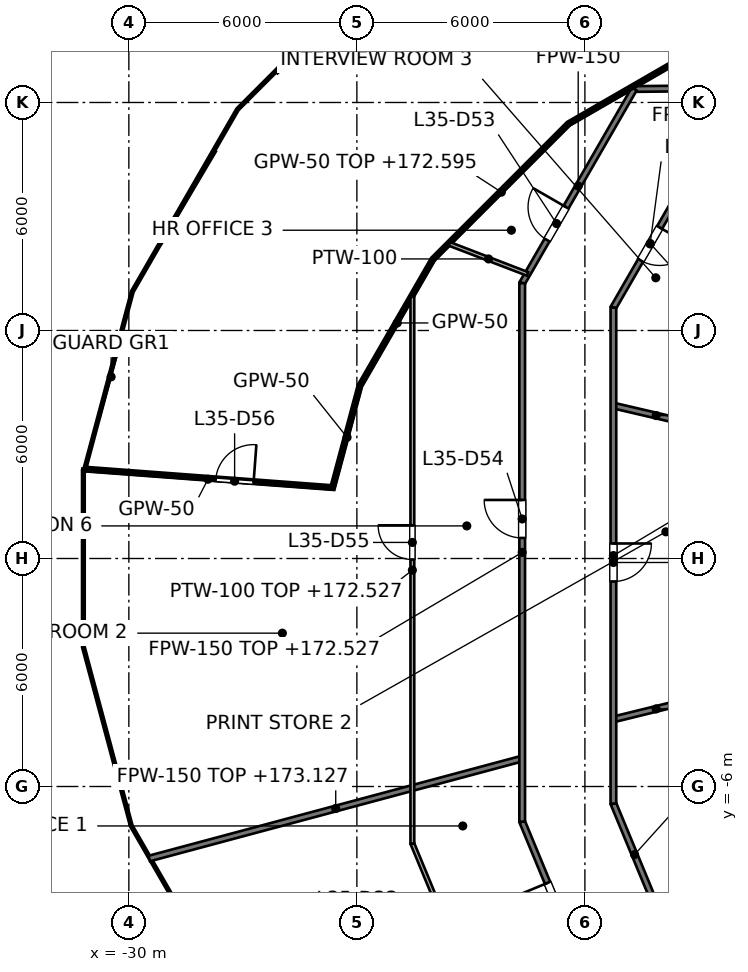
"""IFC4 building model, lengths in metres.
Left out: names, types, materials, properties, quantities, classifications, styles, units other than length and angle.
Written with IfcOpenShell. Run it as: python <this file> out.ifc"""

import sys

from ifc_helpers import new_model, si_unit, direction, frame, frame_2d, origin, place, context, subcontext, project, spatial, rectangle, extrude, element, fill, save


model = new_model("IFC4")
c1 = context("Model", 3, precision=1e-05, world=origin(), true_north=direction((0.0, 1.0)))
c2 = subcontext(c1, "Body", "Model", "MODEL_VIEW")
j1 = project(units=[si_unit("LENGTHUNIT", "METRE"), si_unit("PLANEANGLEUNIT", "RADIAN")], contexts=[c1])
p1 = place(None, origin())
s1 = spatial("IfcSite", under=j1, at=p1, CompositionType="ELEMENT")
p2 = place(p1, origin())
s2 = spatial("IfcBuilding", under=s1, at=p2, CompositionType="ELEMENT")
p3 = place(p2, frame((0.0, 0.0, 169.6)))
s3 = spatial("IfcBuildingStorey", under=s2, at=p3, CompositionType="ELEMENT", Elevation=169.6)
p4 = place(p3, frame((-19.65, -6.925, 0.0), z_axis=(0.0, 0.0, 1.0), x_axis=(0.38279467838, -0.923833445056, 0.0)))
e1 = element("IfcWall", 1, at=p4, inside=s3, PredefinedType="PARTITIONING", context=c2, shape_type="SweptSolid", body=[
    extrude(rectangle(XDim=4.382, YDim=0.15, at=frame_2d((2.191, 0.0))), origin(), (0.0, 0.0, 1.0), 2.995),
])
p5 = place(p4, frame((1.744, 0.0, 0.0)))
e2 = element("IfcOpeningElement", 2, at=p5, cuts=e1, PredefinedType="OPENING", context=c2, shape_type="SweptSolid", body=[
    extrude(rectangle(XDim=1.0, YDim=2.1, at=frame_2d((0.5, 1.05))), frame((0.0, 0.075, 0.0), z_axis=(0.0, -1.0, 0.0), x_axis=(1.0, 0.0, 0.0)), (0.0, 0.0, 1.0), 0.15),
])
p6 = place(p3, frame((-17.25, -6.448, 0.0), z_axis=(0.0, 0.0, 1.0), x_axis=(0.382791482122, -0.923834769434, 0.0)))
e3 = element("IfcWall", 3, at=p6, inside=s3, PredefinedType="PARTITIONING", context=c2, shape_type="SweptSolid", body=[
    extrude(rectangle(XDim=2.91, YDim=0.15, at=frame_2d((1.455, 0.0))), origin(), (0.0, 0.0, 1.0), 2.995),
])
p7 = place(p3, frame((-17.25, 4.024, 0.0), z_axis=(0.0, 0.0, 1.0), x_axis=(0.973873936825, -0.227089311007, 0.0)))
e4 = element("IfcWall", 4, at=p7, inside=s3, PredefinedType="PARTITIONING", context=c2, shape_type="SweptSolid", body=[
    extrude(rectangle(XDim=2.31, YDim=0.15, at=frame_2d((1.155, 0.0))), origin(), (0.0, 0.0, 1.0), 2.927),
])
p8 = place(p3, frame((-16.7, 12.355, 0.0), z_axis=(0.0, 0.0, 1.0), x_axis=(0.999951312483, 0.009867758809, 0.0)))
e5 = element("IfcWall", 5, at=p8, inside=s3, PredefinedType="PARTITIONING", context=c2, shape_type="SweptSolid", body=[
    extrude(rectangle(XDim=30.927, YDim=0.15, at=frame_2d((15.463, 0.0))), origin(), (0.0, 0.0, 1.0), 2.927),
])
p9 = place(p8, frame((27.896, 0.0, 0.0)))
e6 = element("IfcOpeningElement", 6, at=p9, cuts=e5, PredefinedType="OPENING", context=c2, shape_type="SweptSolid", body=[
    extrude(rectangle(XDim=1.0, YDim=2.1, at=frame_2d((0.5, 1.05))), frame((0.0, 0.075, 0.0), z_axis=(0.0, -1.0, 0.0), x_axis=(1.0, 0.0, 0.0)), (0.0, 0.0, 1.0), 0.15),
])
p10 = place(p8, frame((20.733, 0.0, 0.0)))
e7 = element("IfcOpeningElement", 7, at=p10, cuts=e5, PredefinedType="OPENING", context=c2, shape_type="SweptSolid", body=[
    extrude(rectangle(XDim=1.0, YDim=2.1, at=frame_2d((0.5, 1.05))), frame((0.0, 0.075, 0.0), z_axis=(0.0, -1.0, 0.0), x_axis=(1.0, 0.0, 0.0)), (0.0, 0.0, 1.0), 0.15),
])
p11 = place(p8, frame((15.014, 0.0, 0.0)))
e8 = element("IfcOpeningElement", 8, at=p11, cuts=e5, PredefinedType="OPENING", context=c2, shape_type="SweptSolid", body=[
    extrude(rectangle(XDim=1.0, YDim=2.1, at=frame_2d((0.5, 1.05))), frame((0.0, 0.075, 0.0), z_axis=(0.0, -1.0, 0.0), x_axis=(1.0, 0.0, 0.0)), (0.0, 0.0, 1.0), 0.15),
])
p12 = place(p8, frame((8.025, 0.0, 0.0)))
e9 = element("IfcOpeningElement", 9, at=p12, cuts=e5, PredefinedType="OPENING", context=c2, shape_type="SweptSolid", body=[
    extrude(rectangle(XDim=1.0, YDim=2.1, at=frame_2d((0.5, 1.05))), frame((0.0, 0.075, 0.0), z_axis=(0.0, -1.0, 0.0), x_axis=(1.0, 0.0, 0.0)), (0.0, 0.0, 1.0), 0.15),
])
p13 = place(p3, frame((-17.25, -4.234, 0.0), z_axis=(0.0, 0.0, 1.0), x_axis=(0.971126143966, 0.238566578769, 0.0)))
e10 = element("IfcWall", 10, at=p13, inside=s3, PredefinedType="PARTITIONING", context=c2, shape_type="SweptSolid", body=[
    extrude(rectangle(XDim=2.317, YDim=0.15, at=frame_2d((1.158, 0.0))), origin(), (0.0, 0.0, 1.0), 2.927),
])
p14 = place(p3, frame((-29.463, -7.895, 0.0), z_axis=(0.0, 0.0, 1.0), x_axis=(0.965899878732, 0.258915863296, 0.0)))
e11 = element("IfcWall", 11, at=p14, inside=s3, PredefinedType="PARTITIONING", context=c2, shape_type="SweptSolid", body=[
    extrude(rectangle(XDim=10.159, YDim=0.15, at=frame_2d((5.08, 0.0))), origin(), (0.0, 0.0, 1.0), 3.527),
])
p15 = place(p3, frame((-17.25, 6.603, 0.0), z_axis=(0.0, 0.0, 1.0), x_axis=(0.499659014053, 0.866222182627, 0.0)))
e12 = element("IfcWall", 12, at=p15, inside=s3, PredefinedType="PARTITIONING", context=c2, shape_type="SweptSolid", body=[
    extrude(rectangle(XDim=3.887, YDim=0.15, at=frame_2d((1.943, 0.0))), origin(), (0.0, 0.0, 1.0), 2.995),
])
p16 = place(p15, frame((1.434, 0.0, 0.0)))
e13 = element("IfcOpeningElement", 13, at=p16, cuts=e12, PredefinedType="OPENING", context=c2, shape_type="SweptSolid", body=[
    extrude(rectangle(XDim=1.0, YDim=2.1, at=frame_2d((0.5, 1.05))), frame((0.0, 0.075, 0.0), z_axis=(0.0, -1.0, 0.0), x_axis=(1.0, 0.0, 0.0)), (0.0, 0.0, 1.0), 0.15),
])
p17 = place(p3, frame((-19.65, 7.246, 0.0), z_axis=(0.0, 0.0, 1.0), x_axis=(0.499673489744, 0.866213832519, 0.0)))
e14 = element("IfcWall", 14, at=p17, inside=s3, PredefinedType="PARTITIONING", context=c2, shape_type="SweptSolid", body=[
    extrude(rectangle(XDim=5.899, YDim=0.15, at=frame_2d((2.95, 0.0))), origin(), (0.0, 0.0, 1.0), 2.995),
])
p18 = place(p17, frame((1.31, 0.0, 0.0)))
e15 = element("IfcOpeningElement", 15, at=p18, cuts=e14, PredefinedType="OPENING", context=c2, shape_type="SweptSolid", body=[
    extrude(rectangle(XDim=1.0, YDim=2.1, at=frame_2d((0.5, 1.05))), frame((0.0, 0.075, 0.0), z_axis=(0.0, -1.0, 0.0), x_axis=(1.0, 0.0, 0.0)), (0.0, 0.0, 1.0), 0.15),
])
p19 = place(p3, frame((-17.25, -6.448, 0.0), z_axis=(0.0, 0.0, 1.0), x_axis=(0.0, 1.0, 0.0)))
e16 = element("IfcWall", 16, at=p19, inside=s3, PredefinedType="PARTITIONING", context=c2, shape_type="SweptSolid", body=[
    extrude(rectangle(XDim=13.051, YDim=0.15, at=frame_2d((6.525, 0.0))), origin(), (0.0, 0.0, 1.0), 2.927),
])
p20 = place(p19, frame((5.843, 0.0, 0.0)))
e17 = element("IfcOpeningElement", 17, at=p20, cuts=e16, PredefinedType="OPENING", context=c2, shape_type="SweptSolid", body=[
    extrude(rectangle(XDim=1.0, YDim=2.1, at=frame_2d((0.5, 1.05))), frame((0.0, 0.075, 0.0), z_axis=(0.0, -1.0, 0.0), x_axis=(1.0, 0.0, 0.0)), (0.0, 0.0, 1.0), 0.15),
])
p21 = place(p3, frame((-19.65, -6.925, 0.0), z_axis=(0.0, 0.0, 1.0), x_axis=(0.0, 1.0, 0.0)))
e18 = element("IfcWall", 18, at=p21, inside=s3, PredefinedType="PARTITIONING", context=c2, shape_type="SweptSolid", body=[
    extrude(rectangle(XDim=14.171, YDim=0.15, at=frame_2d((7.085, 0.0))), origin(), (0.0, 0.0, 1.0), 2.927),
])
p22 = place(p21, frame((7.466, 0.0, 0.0)))
e19 = element("IfcOpeningElement", 19, at=p22, cuts=e18, PredefinedType="OPENING", context=c2, shape_type="SweptSolid", body=[
    extrude(rectangle(XDim=1.0, YDim=2.1, at=frame_2d((0.5, 1.05))), frame((0.0, 0.075, 0.0), z_axis=(0.0, -1.0, 0.0), x_axis=(1.0, 0.0, 0.0)), (0.0, 0.0, 1.0), 0.15),
])
p23 = place(p3, frame((-31.216, 2.332, 0.0), z_axis=(0.0, 0.0, 1.0), x_axis=(0.997231283114, -0.074362409721, 0.0)))
e20 = element("IfcWall", 20, at=p23, inside=s3, PredefinedType="PARTITIONING", context=c2, shape_type="SweptSolid", body=[
    extrude(rectangle(XDim=6.615, YDim=0.05, at=frame_2d((3.308, 0.0))), origin(), (0.0, 0.0, 1.0), 2.927),
])
p24 = place(p23, frame((3.51, 0.0, 0.0)))
e21 = element("IfcOpeningElement", 21, at=p24, cuts=e20, PredefinedType="OPENING", context=c2, shape_type="SweptSolid", body=[
    extrude(rectangle(XDim=1.0, YDim=2.1, at=frame_2d((0.5, 1.05))), frame((0.0, 0.025, 0.0), z_axis=(0.0, -1.0, 0.0), x_axis=(1.0, 0.0, 0.0)), (0.0, 0.0, 1.0), 0.05),
])
p25 = place(p3, frame((-18.419, 11.419, 0.0), z_axis=(0.0, 0.0, 1.0), x_axis=(0.866045865693, 0.499964557259, 0.0)))
e22 = element("IfcWall", 22, at=p25, inside=s3, PredefinedType="PARTITIONING", context=c2, shape_type="SweptSolid", body=[
    extrude(rectangle(XDim=6.692, YDim=0.05, at=frame_2d((3.346, 0.0))), origin(), (0.0, 0.0, 1.0), 2.995),
])
p26 = place(p3, frame((-21.977, 7.861, 0.0), z_axis=(0.0, 0.0, 1.0), x_axis=(0.70713104079, 0.707082520751, 0.0)))
e23 = element("IfcWall", 23, at=p26, inside=s3, PredefinedType="PARTITIONING", context=c2, shape_type="SweptSolid", body=[
    extrude(rectangle(XDim=5.032, YDim=0.05, at=frame_2d((2.516, 0.0))), origin(), (0.0, 0.0, 1.0), 2.995),
])
p27 = place(p3, frame((-23.897, 4.536, 0.0), z_axis=(0.0, 0.0, 1.0), x_axis=(0.500023335103, 0.866011930837, 0.0)))
e24 = element("IfcWall", 24, at=p27, inside=s3, PredefinedType="PARTITIONING", context=c2, shape_type="SweptSolid", body=[
    extrude(rectangle(XDim=3.84, YDim=0.05, at=frame_2d((1.92, 0.0))), origin(), (0.0, 0.0, 1.0), 2.927),
])
p28 = place(p3, frame((-24.619, 1.84, 0.0), z_axis=(0.0, 0.0, 1.0), x_axis=(0.258680696783, 0.965962885991, 0.0)))
e25 = element("IfcWall", 25, at=p28, inside=s3, PredefinedType="PARTITIONING", context=c2, shape_type="SweptSolid", body=[
    extrude(rectangle(XDim=2.791, YDim=0.05, at=frame_2d((1.396, 0.0))), origin(), (0.0, 0.0, 1.0), 2.927),
])
p29 = place(p3, frame((-22.54, -7.5, 0.0), z_axis=(0.0, 0.0, 1.0), x_axis=(0.382704529509, -0.923870793506, 0.0)))
e26 = element("IfcWall", 26, at=p29, inside=s3, PredefinedType="PARTITIONING", context=c2, shape_type="SweptSolid", body=[
    extrude(rectangle(XDim=6.154, YDim=0.1, at=frame_2d((3.077, 0.0))), origin(), (0.0, 0.0, 1.0), 2.995),
])
p30 = place(p3, frame((-21.561, 8.277, 0.0), z_axis=(0.0, 0.0, 1.0), x_axis=(0.933462969835, -0.358673784862, 0.0)))
e27 = element("IfcWall", 27, at=p30, inside=s3, PredefinedType="PARTITIONING", context=c2, shape_type="SweptSolid", body=[
    extrude(rectangle(XDim=2.197, YDim=0.1, at=frame_2d((1.099, 0.0))), origin(), (0.0, 0.0, 1.0), 3.85),
])
p31 = place(p3, frame((-22.54, -7.5, 0.0), z_axis=(0.0, 0.0, 1.0), x_axis=(0.0, 1.0, 0.0)))
e28 = element("IfcWall", 28, at=p31, inside=s3, PredefinedType="PARTITIONING", context=c2, shape_type="SweptSolid", body=[
    extrude(rectangle(XDim=14.386, YDim=0.1, at=frame_2d((7.193, 0.0))), origin(), (0.0, 0.0, 1.0), 2.927),
])
p32 = place(p31, frame((7.473, 0.0, 0.0)))
e29 = element("IfcOpeningElement", 29, at=p32, cuts=e28, PredefinedType="OPENING", context=c2, shape_type="SweptSolid", body=[
    extrude(rectangle(XDim=0.9, YDim=2.1, at=frame_2d((0.45, 1.05))), frame((0.0, 0.05, 0.0), z_axis=(0.0, -1.0, 0.0), x_axis=(1.0, 0.0, 0.0)), (0.0, 0.0, 1.0), 0.1),
])
p33 = place(p16, origin())
e30 = element("IfcDoor", 30, at=p33, inside=s3, OperationType="SINGLE_SWING_RIGHT", PredefinedType="DOOR", context=c2, shape_type="SweptSolid", body=[
    extrude(rectangle(XDim=1.0, YDim=2.1, at=frame_2d((0.5, 1.05))), frame((0.0, 0.025, 0.0), z_axis=(0.0, -1.0, 0.0), x_axis=(1.0, 0.0, 0.0)), (0.0, 0.0, 1.0), 0.05),
])
fill(e13, e30)
p34 = place(p20, origin())
e31 = element("IfcDoor", 31, at=p34, inside=s3, OperationType="SINGLE_SWING_RIGHT", PredefinedType="DOOR", context=c2, shape_type="SweptSolid", body=[
    extrude(rectangle(XDim=1.0, YDim=2.1, at=frame_2d((0.5, 1.05))), frame((0.0, 0.025, 0.0), z_axis=(0.0, -1.0, 0.0), x_axis=(1.0, 0.0, 0.0)), (0.0, 0.0, 1.0), 0.05),
])
fill(e17, e31)
p35 = place(p5, origin())
e32 = element("IfcDoor", 32, at=p35, inside=s3, OperationType="SINGLE_SWING_LEFT", PredefinedType="DOOR", context=c2, shape_type="SweptSolid", body=[
    extrude(rectangle(XDim=1.0, YDim=2.1, at=frame_2d((0.5, 1.05))), frame((0.0, 0.025, 0.0), z_axis=(0.0, -1.0, 0.0), x_axis=(1.0, 0.0, 0.0)), (0.0, 0.0, 1.0), 0.05),
])
fill(e2, e32)
p36 = place(p18, origin())
e33 = element("IfcDoor", 33, at=p36, inside=s3, OperationType="SINGLE_SWING_RIGHT", PredefinedType="DOOR", context=c2, shape_type="SweptSolid", body=[
    extrude(rectangle(XDim=1.0, YDim=2.1, at=frame_2d((0.5, 1.05))), frame((0.0, 0.025, 0.0), z_axis=(0.0, -1.0, 0.0), x_axis=(1.0, 0.0, 0.0)), (0.0, 0.0, 1.0), 0.05),
])
fill(e15, e33)
p37 = place(p22, origin())
e34 = element("IfcDoor", 34, at=p37, inside=s3, OperationType="SINGLE_SWING_RIGHT", PredefinedType="DOOR", context=c2, shape_type="SweptSolid", body=[
    extrude(rectangle(XDim=1.0, YDim=2.1, at=frame_2d((0.5, 1.05))), frame((0.0, 0.025, 0.0), z_axis=(0.0, -1.0, 0.0), x_axis=(1.0, 0.0, 0.0)), (0.0, 0.0, 1.0), 0.05),
])
fill(e19, e34)
p38 = place(p32, origin())
e35 = element("IfcDoor", 35, at=p38, inside=s3, OperationType="SINGLE_SWING_RIGHT", PredefinedType="DOOR", context=c2, shape_type="SweptSolid", body=[
    extrude(rectangle(XDim=0.9, YDim=2.1, at=frame_2d((0.45, 1.05))), frame((0.0, 0.025, 0.0), z_axis=(0.0, -1.0, 0.0), x_axis=(1.0, 0.0, 0.0)), (0.0, 0.0, 1.0), 0.05),
])
fill(e29, e35)
p39 = place(p24, origin())
e36 = element("IfcDoor", 36, at=p39, inside=s3, OperationType="SINGLE_SWING_RIGHT", PredefinedType="DOOR", context=c2, shape_type="SweptSolid", body=[
    extrude(rectangle(XDim=1.0, YDim=2.1, at=frame_2d((0.5, 1.05))), frame((0.0, 0.025, 0.0), z_axis=(0.0, -1.0, 0.0), x_axis=(1.0, 0.0, 0.0)), (0.0, 0.0, 1.0), 0.05),
])
fill(e21, e36)
save(model, sys.argv[1])
